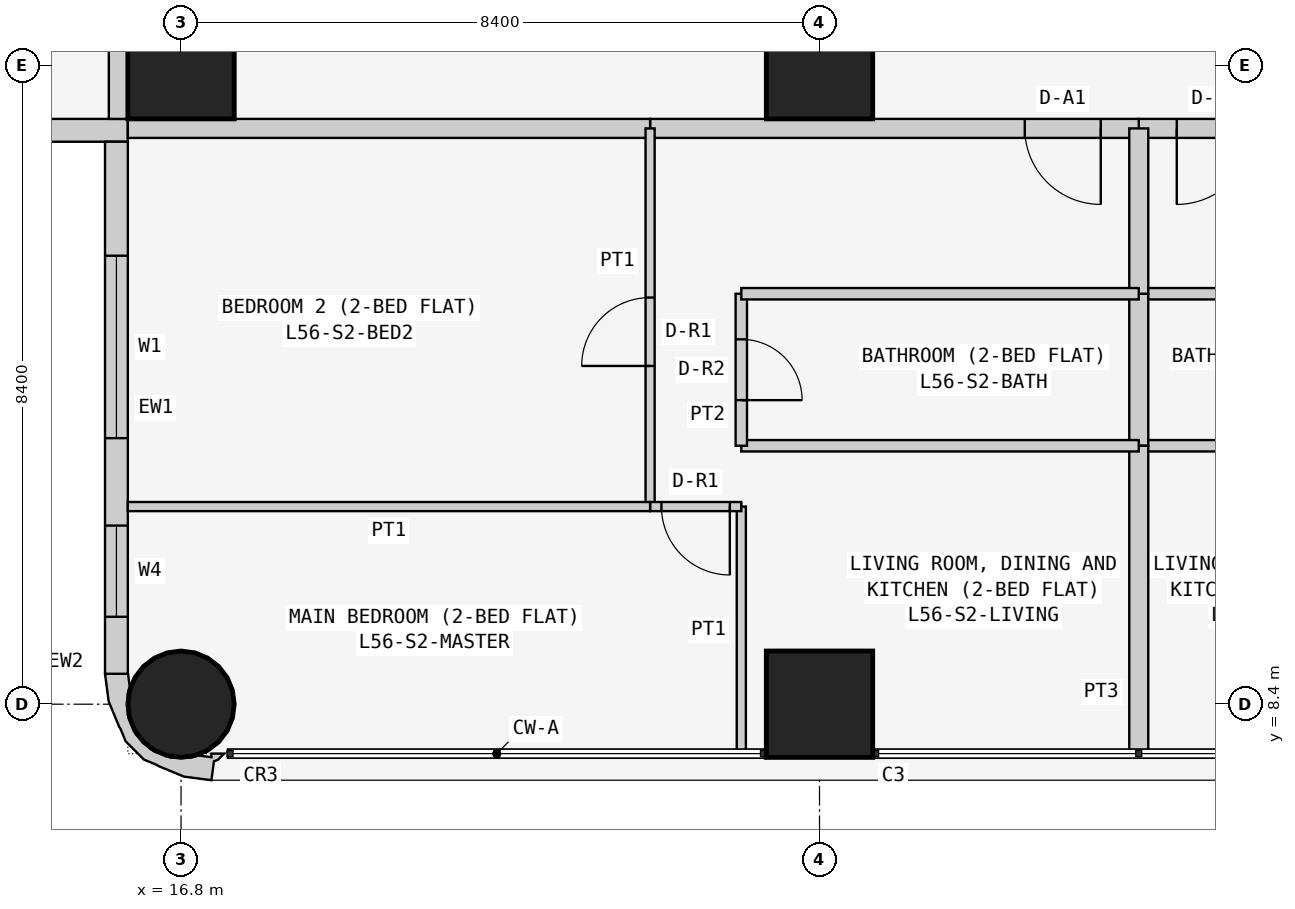
"""IFC4 building model, lengths in metres.
Left out: names, types, materials, properties, quantities, classifications, styles, units other than length and angle.
Written with IfcOpenShell. Run it as: python <this file> out.ifc"""

import sys

from ifc_helpers import new_model, si_unit, direction, frame, frame_2d, origin, origin_2d, place, context, subcontext, project, spatial, polyline, rectangle, circle, outline, extrude, element, fill, save


model = new_model("IFC4")
c1 = context("Model", 3, precision=1e-05, world=origin(), true_north=direction((0.0, 1.0)))
c2 = subcontext(c1, "Body", "Model", "MODEL_VIEW")
j1 = project(units=[si_unit("LENGTHUNIT", "METRE"), si_unit("PLANEANGLEUNIT", "RADIAN")], contexts=[c1])
p1 = place(None, origin())
s1 = spatial("IfcSite", under=j1, at=p1, CompositionType="ELEMENT")
p2 = place(p1, origin())
s2 = spatial("IfcBuilding", under=s1, at=p2, CompositionType="ELEMENT")
p3 = place(p2, frame((0.0, 0.0, 215.7)))
s3 = spatial("IfcBuildingStorey", under=s2, at=p3, CompositionType="ELEMENT", Elevation=215.7)
p4 = place(p3, frame((16.8, 8.4, 0.0), z_axis=(0.0, 0.0, 1.0), x_axis=(1.0, 0.0, 0.0)))
e1 = element("IfcColumn", 1, at=p4, inside=s3, PredefinedType="COLUMN", context=c2, shape_type="SweptSolid", body=[
    extrude(circle(Radius=0.7, at=origin_2d()), origin(), (0.0, 0.0, 1.0), 3.6),
])
for number, where, z_axis, x_axis in (
    (2, (16.8, 16.8, 0.0), (0.0, 0.0, 1.0), (1.0, 0.0, 0.0)),
    (3, (25.2, 8.4, 0.0), (0.0, 0.0, 1.0), (1.0, 0.0, 0.0)),
    (4, (25.2, 16.8, 0.0), (0.0, 0.0, 1.0), (1.0, 0.0, 0.0)),
):
    element("IfcColumn", number, at=place(p3, frame(where, z_axis=z_axis, x_axis=x_axis)), inside=s3, PredefinedType="COLUMN", context=c2, shape_type="SweptSolid", body=[
        extrude(rectangle(XDim=1.4, YDim=1.4, at=origin_2d()), origin(), (0.0, 0.0, 1.0), 3.6),
    ])
p5 = place(p3, frame((0.4, 15.95, 0.0), z_axis=(0.0, 0.0, 1.0), x_axis=(1.0, 0.0, 0.0)))
e5 = element("IfcWall", 5, at=p5, inside=s3, PredefinedType="SOLIDWALL", context=c2, shape_type="SweptSolid", body=[
    extrude(rectangle(XDim=15.7, YDim=0.3, at=frame_2d((7.85, 0.0))), origin(), (0.0, 0.0, 1.0), 3.45),
])
p6 = place(p5, frame((12.4, 0.0, 0.9)))
e6 = element("IfcOpeningElement", 6, at=p6, cuts=e5, PredefinedType="OPENING", context=c2, shape_type="SweptSolid", body=[
    extrude(rectangle(XDim=1.8, YDim=1.5, at=frame_2d((0.9, 0.75))), frame((0.0, 0.16, 0.0), z_axis=(0.0, -1.0, 0.0), x_axis=(1.0, 0.0, 0.0)), (0.0, 0.0, 1.0), 0.32),
])
p7 = place(p5, frame((9.55, 0.0, 1.5)))
e7 = element("IfcOpeningElement", 7, at=p7, cuts=e5, PredefinedType="OPENING", context=c2, shape_type="SweptSolid", body=[
    extrude(rectangle(XDim=0.9, YDim=0.7, at=frame_2d((0.45, 0.35))), frame((0.0, 0.16, 0.0), z_axis=(0.0, -1.0, 0.0), x_axis=(1.0, 0.0, 0.0)), (0.0, 0.0, 1.0), 0.32),
])
p8 = place(p5, frame((5.1, 0.0, 0.9)))
e8 = element("IfcOpeningElement", 8, at=p8, cuts=e5, PredefinedType="OPENING", context=c2, shape_type="SweptSolid", body=[
    extrude(rectangle(XDim=1.8, YDim=1.5, at=frame_2d((0.9, 0.75))), frame((0.0, 0.16, 0.0), z_axis=(0.0, -1.0, 0.0), x_axis=(1.0, 0.0, 0.0)), (0.0, 0.0, 1.0), 0.32),
])
p9 = place(p5, frame((2.0, 0.0, 0.0)))
e9 = element("IfcOpeningElement", 9, at=p9, cuts=e5, PredefinedType="OPENING", context=c2, shape_type="SweptSolid", body=[
    extrude(rectangle(XDim=0.9, YDim=2.4, at=frame_2d((0.45, 1.2))), frame((0.0, 0.16, 0.0), z_axis=(0.0, -1.0, 0.0), x_axis=(1.0, 0.0, 0.0)), (0.0, 0.0, 1.0), 0.32),
])
p10 = place(p5, frame((0.7, 0.0, 0.9)))
e10 = element("IfcOpeningElement", 10, at=p10, cuts=e5, PredefinedType="OPENING", context=c2, shape_type="SweptSolid", body=[
    extrude(rectangle(XDim=1.2, YDim=1.5, at=frame_2d((0.6, 0.75))), frame((0.0, 0.16, 0.0), z_axis=(0.0, -1.0, 0.0), x_axis=(1.0, 0.0, 0.0)), (0.0, 0.0, 1.0), 0.32),
])
p11 = place(p3, frame((15.95, 15.8, 0.0), z_axis=(0.0, 0.0, 1.0), x_axis=(0.0, -1.0, 0.0)))
e11 = element("IfcWall", 11, at=p11, inside=s3, PredefinedType="SOLIDWALL", context=c2, shape_type="SweptSolid", body=[
    extrude(rectangle(XDim=7.0, YDim=0.3, at=frame_2d((3.5, 0.0))), origin(), (0.0, 0.0, 1.0), 3.45),
])
p12 = place(p11, frame((1.5, 0.0, 0.9)))
e12 = element("IfcOpeningElement", 12, at=p12, cuts=e11, PredefinedType="OPENING", context=c2, shape_type="SweptSolid", body=[
    extrude(rectangle(XDim=2.4, YDim=1.5, at=frame_2d((1.2, 0.75))), frame((0.0, 0.16, 0.0), z_axis=(0.0, -1.0, 0.0), x_axis=(1.0, 0.0, 0.0)), (0.0, 0.0, 1.0), 0.32),
])
p13 = place(p11, frame((5.05, 0.0, 0.9)))
e13 = element("IfcOpeningElement", 13, at=p13, cuts=e11, PredefinedType="OPENING", context=c2, shape_type="SweptSolid", body=[
    extrude(rectangle(XDim=1.2, YDim=1.5, at=frame_2d((0.6, 0.75))), frame((0.0, 0.16, 0.0), z_axis=(0.0, -1.0, 0.0), x_axis=(1.0, 0.0, 0.0)), (0.0, 0.0, 1.0), 0.32),
])
p14 = place(p3, frame((16.076, 8.69, 0.0), z_axis=(0.0, 0.0, 1.0), x_axis=(-0.439933741929, -0.898030234854, 0.0)))
e14 = element("IfcWall", 14, at=p14, inside=s3, PredefinedType="SOLIDWALL", context=c2, shape_type="SweptSolid", body=[
    extrude(outline(polyline([(0.664, 1.577), (0.426, 1.497), (0.382, 1.536), (0.276, 1.572), (0.349, 1.423), (0.392, 1.444), (0.453, 1.261), (0.51, 1.211), (0.632, 0.961), (0.65, 0.683), (0.56, 0.419), (0.375, 0.21), (0.125, 0.087), (0.05, 0.082), (-0.127, -0.035), (-0.145, -0.044), (0.022, -0.296), (0.327, -0.094), (0.568, 0.18), (0.578, 0.199), (0.7, 0.337), (0.811, 0.661), (0.799, 0.846), (0.803, 0.866), (0.78, 1.231), (0.664, 1.577)])), origin(), (0.0, 0.0, 1.0), 3.45),
])
p15 = place(p3, frame((35.829, 15.975, 0.0), z_axis=(0.0, 0.0, 1.0), x_axis=(-1.0, 0.0, 0.0)))
e15 = element("IfcWall", 15, at=p15, inside=s3, PredefinedType="PARTITIONING", context=c2, shape_type="SweptSolid", body=[
    extrude(rectangle(XDim=6.429, YDim=0.25, at=frame_2d((3.215, 0.0))), origin(), (0.0, 0.0, 1.0), 3.45),
])
p16 = place(p15, frame((4.929, 0.0, 0.0)))
e16 = element("IfcOpeningElement", 16, at=p16, cuts=e15, PredefinedType="OPENING", context=c2, shape_type="SweptSolid", body=[
    extrude(rectangle(XDim=1.0, YDim=2.1, at=frame_2d((0.5, 1.05))), frame((0.0, 0.135, 0.0), z_axis=(0.0, -1.0, 0.0), x_axis=(1.0, 0.0, 0.0)), (0.0, 0.0, 1.0), 0.27),
])
p17 = place(p3, frame((29.4, 15.975, 0.0), z_axis=(0.0, 0.0, 1.0), x_axis=(-1.0, 0.0, 0.0)))
e17 = element("IfcWall", 17, at=p17, inside=s3, PredefinedType="PARTITIONING", context=c2, shape_type="SweptSolid", body=[
    extrude(rectangle(XDim=6.429, YDim=0.25, at=frame_2d((3.214, 0.0))), origin(), (0.0, 0.0, 1.0), 3.45),
])
p18 = place(p17, frame((0.5, 0.0, 0.0)))
e18 = element("IfcOpeningElement", 18, at=p18, cuts=e17, PredefinedType="OPENING", context=c2, shape_type="SweptSolid", body=[
    extrude(rectangle(XDim=1.0, YDim=2.1, at=frame_2d((0.5, 1.05))), frame((0.0, 0.135, 0.0), z_axis=(0.0, -1.0, 0.0), x_axis=(1.0, 0.0, 0.0)), (0.0, 0.0, 1.0), 0.27),
])
p19 = place(p3, frame((22.971, 15.975, 0.0), z_axis=(0.0, 0.0, 1.0), x_axis=(-1.0, 0.0, 0.0)))
e19 = element("IfcWall", 19, at=p19, inside=s3, PredefinedType="PARTITIONING", context=c2, shape_type="SweptSolid", body=[
    extrude(rectangle(XDim=6.871, YDim=0.25, at=frame_2d((3.436, 0.0))), origin(), (0.0, 0.0, 1.0), 3.45),
])
p20 = place(p3, frame((15.975, 16.1, 0.0), z_axis=(0.0, 0.0, 1.0), x_axis=(0.0, 1.0, 0.0)))
e20 = element("IfcWall", 20, at=p20, inside=s3, PredefinedType="PARTITIONING", context=c2, shape_type="SweptSolid", body=[
    extrude(rectangle(XDim=6.471, YDim=0.25, at=frame_2d((3.235, 0.0))), origin(), (0.0, 0.0, 1.0), 3.45),
])
for number, where, z_axis, x_axis in (
    (21, (29.4, 11.8, 0.0), (0.0, 0.0, 1.0), (1.0, 0.0, 0.0)),
    (22, (34.629, 13.8, 0.0), (0.0, 0.0, 1.0), (-1.0, 0.0, 0.0)),
):
    element("IfcWall", number, at=place(p3, frame(where, z_axis=z_axis, x_axis=x_axis)), inside=s3, PredefinedType="PARTITIONING", context=c2, shape_type="SweptSolid", body=[
        extrude(rectangle(XDim=5.229, YDim=0.15, at=frame_2d((2.615, 0.0))), origin(), (0.0, 0.0, 1.0), 3.45),
    ])
p21 = place(p3, frame((29.4, 13.8, 0.0), z_axis=(0.0, 0.0, 1.0), x_axis=(0.0, -1.0, 0.0)))
e23 = element("IfcWall", 23, at=p21, inside=s3, PredefinedType="PARTITIONING", context=c2, shape_type="SweptSolid", body=[
    extrude(rectangle(XDim=2.0, YDim=0.25, at=frame_2d((1.0, 0.0))), origin(), (0.0, 0.0, 1.0), 2.848),
])
p22 = place(p3, frame((29.4, 7.75, 0.0), z_axis=(0.0, 0.0, 1.0), x_axis=(0.0, 1.0, 0.0)))
e24 = element("IfcWall", 24, at=p22, inside=s3, PredefinedType="PARTITIONING", context=c2, shape_type="SweptSolid", body=[
    extrude(rectangle(XDim=4.05, YDim=0.25, at=frame_2d((2.025, 0.0))), origin(), (0.0, 0.0, 1.0), 2.848),
])
p23 = place(p3, frame((29.4, 13.8, 0.0), z_axis=(0.0, 0.0, 1.0), x_axis=(0.0, 1.0, 0.0)))
e25 = element("IfcWall", 25, at=p23, inside=s3, PredefinedType="PARTITIONING", context=c2, shape_type="SweptSolid", body=[
    extrude(rectangle(XDim=2.175, YDim=0.25, at=frame_2d((1.087, 0.0))), origin(), (0.0, 0.0, 1.0), 2.848),
])
p24 = place(p3, frame((29.4, 11.8, 0.0), z_axis=(0.0, 0.0, 1.0), x_axis=(-1.0, 0.0, 0.0)))
e26 = element("IfcWall", 26, at=p24, inside=s3, PredefinedType="PARTITIONING", context=c2, shape_type="SweptSolid", body=[
    extrude(rectangle(XDim=5.229, YDim=0.15, at=frame_2d((2.615, 0.0))), origin(), (0.0, 0.0, 1.0), 3.45),
])
p25 = place(p3, frame((24.171, 11.8, 0.0), z_axis=(0.0, 0.0, 1.0), x_axis=(0.0, 1.0, 0.0)))
e27 = element("IfcWall", 27, at=p25, inside=s3, PredefinedType="PARTITIONING", context=c2, shape_type="SweptSolid", body=[
    extrude(rectangle(XDim=2.0, YDim=0.15, at=frame_2d((1.0, 0.0))), origin(), (0.0, 0.0, 1.0), 3.45),
])
p26 = place(p25, frame((0.6, 0.0, 0.0)))
e28 = element("IfcOpeningElement", 28, at=p26, cuts=e27, PredefinedType="OPENING", context=c2, shape_type="SweptSolid", body=[
    extrude(rectangle(XDim=0.8, YDim=2.1, at=frame_2d((0.4, 1.05))), frame((0.0, 0.085, 0.0), z_axis=(0.0, -1.0, 0.0), x_axis=(1.0, 0.0, 0.0)), (0.0, 0.0, 1.0), 0.17),
])
p27 = place(p3, frame((24.171, 13.8, 0.0), z_axis=(0.0, 0.0, 1.0), x_axis=(1.0, 0.0, 0.0)))
e29 = element("IfcWall", 29, at=p27, inside=s3, PredefinedType="PARTITIONING", context=c2, shape_type="SweptSolid", body=[
    extrude(rectangle(XDim=5.229, YDim=0.15, at=frame_2d((2.615, 0.0))), origin(), (0.0, 0.0, 1.0), 3.45),
])
p28 = place(p3, frame((22.971, 11.0, 0.0), z_axis=(0.0, 0.0, 1.0), x_axis=(0.0, 1.0, 0.0)))
e30 = element("IfcWall", 30, at=p28, inside=s3, PredefinedType="PARTITIONING", context=c2, shape_type="SweptSolid", body=[
    extrude(rectangle(XDim=4.975, YDim=0.12, at=frame_2d((2.488, 0.0))), origin(), (0.0, 0.0, 1.0), 3.45),
])
p29 = place(p28, frame((1.85, 0.0, 0.0)))
e31 = element("IfcOpeningElement", 31, at=p29, cuts=e30, PredefinedType="OPENING", context=c2, shape_type="SweptSolid", body=[
    extrude(rectangle(XDim=0.9, YDim=2.1, at=frame_2d((0.45, 1.05))), frame((0.0, 0.07, 0.0), z_axis=(0.0, -1.0, 0.0), x_axis=(1.0, 0.0, 0.0)), (0.0, 0.0, 1.0), 0.14),
])
p30 = place(p3, frame((24.171, 7.75, 0.0), z_axis=(0.0, 0.0, 1.0), x_axis=(0.0, 1.0, 0.0)))
e32 = element("IfcWall", 32, at=p30, inside=s3, PredefinedType="PARTITIONING", context=c2, shape_type="SweptSolid", body=[
    extrude(rectangle(XDim=3.25, YDim=0.12, at=frame_2d((1.625, 0.0))), origin(), (0.0, 0.0, 1.0), 3.45),
])
p31 = place(p3, frame((24.171, 11.0, 0.0), z_axis=(0.0, 0.0, 1.0), x_axis=(-1.0, 0.0, 0.0)))
e33 = element("IfcWall", 33, at=p31, inside=s3, PredefinedType="PARTITIONING", context=c2, shape_type="SweptSolid", body=[
    extrude(rectangle(XDim=1.2, YDim=0.12, at=frame_2d((0.6, 0.0))), origin(), (0.0, 0.0, 1.0), 3.45),
])
p32 = place(p31, frame((0.151, 0.0, 0.0)))
e34 = element("IfcOpeningElement", 34, at=p32, cuts=e33, PredefinedType="OPENING", context=c2, shape_type="SweptSolid", body=[
    extrude(rectangle(XDim=0.9, YDim=2.1, at=frame_2d((0.45, 1.05))), frame((0.0, 0.07, 0.0), z_axis=(0.0, -1.0, 0.0), x_axis=(1.0, 0.0, 0.0)), (0.0, 0.0, 1.0), 0.14),
])
p33 = place(p3, frame((22.971, 11.0, 0.0), z_axis=(0.0, 0.0, 1.0), x_axis=(-1.0, 0.0, 0.0)))
e35 = element("IfcWall", 35, at=p33, inside=s3, PredefinedType="PARTITIONING", context=c2, shape_type="SweptSolid", body=[
    extrude(rectangle(XDim=6.871, YDim=0.12, at=frame_2d((3.436, 0.0))), origin(), (0.0, 0.0, 1.0), 3.45),
])
p34 = place(p12, origin())
e36 = element("IfcWindow", 36, at=p34, inside=s3, PartitioningType="SINGLE_PANEL", PredefinedType="WINDOW", context=c2, shape_type="SweptSolid", body=[
    extrude(rectangle(XDim=2.4, YDim=1.5, at=frame_2d((1.2, 0.75))), frame((0.0, 0.03, 0.0), z_axis=(0.0, -1.0, 0.0), x_axis=(1.0, 0.0, 0.0)), (0.0, 0.0, 1.0), 0.06),
])
fill(e12, e36)
p35 = place(p13, origin())
e37 = element("IfcWindow", 37, at=p35, inside=s3, PartitioningType="SINGLE_PANEL", PredefinedType="WINDOW", context=c2, shape_type="SweptSolid", body=[
    extrude(rectangle(XDim=1.2, YDim=1.5, at=frame_2d((0.6, 0.75))), frame((0.0, 0.03, 0.0), z_axis=(0.0, -1.0, 0.0), x_axis=(1.0, 0.0, 0.0)), (0.0, 0.0, 1.0), 0.06),
])
fill(e13, e37)
p36 = place(p16, origin())
e38 = element("IfcDoor", 38, at=p36, inside=s3, OperationType="SINGLE_SWING_RIGHT", PredefinedType="DOOR", context=c2, shape_type="SweptSolid", body=[
    extrude(rectangle(XDim=1.0, YDim=2.1, at=frame_2d((0.5, 1.05))), frame((0.0, 0.025, 0.0), z_axis=(0.0, -1.0, 0.0), x_axis=(1.0, 0.0, 0.0)), (0.0, 0.0, 1.0), 0.05),
])
fill(e16, e38)
p37 = place(p18, origin())
e39 = element("IfcDoor", 39, at=p37, inside=s3, OperationType="SINGLE_SWING_LEFT", PredefinedType="DOOR", context=c2, shape_type="SweptSolid", body=[
    extrude(rectangle(XDim=1.0, YDim=2.1, at=frame_2d((0.5, 1.05))), frame((0.0, 0.025, 0.0), z_axis=(0.0, -1.0, 0.0), x_axis=(1.0, 0.0, 0.0)), (0.0, 0.0, 1.0), 0.05),
])
fill(e18, e39)
p38 = place(p26, frame((0.8, 0.0, 0.0), z_axis=(0.0, 0.0, 1.0), x_axis=(-1.0, 0.0, 0.0)))
e40 = element("IfcDoor", 40, at=p38, inside=s3, OperationType="SINGLE_SWING_RIGHT", PredefinedType="DOOR", context=c2, shape_type="SweptSolid", body=[
    extrude(rectangle(XDim=0.8, YDim=2.1, at=frame_2d((0.4, 1.05))), frame((0.0, 0.025, 0.0), z_axis=(0.0, -1.0, 0.0), x_axis=(1.0, 0.0, 0.0)), (0.0, 0.0, 1.0), 0.05),
])
fill(e28, e40)
p39 = place(p29, origin())
e41 = element("IfcDoor", 41, at=p39, inside=s3, OperationType="SINGLE_SWING_LEFT", PredefinedType="DOOR", context=c2, shape_type="SweptSolid", body=[
    extrude(rectangle(XDim=0.9, YDim=2.1, at=frame_2d((0.45, 1.05))), frame((0.0, 0.025, 0.0), z_axis=(0.0, -1.0, 0.0), x_axis=(1.0, 0.0, 0.0)), (0.0, 0.0, 1.0), 0.05),
])
fill(e31, e41)
p40 = place(p32, origin())
e42 = element("IfcDoor", 42, at=p40, inside=s3, OperationType="SINGLE_SWING_LEFT", PredefinedType="DOOR", context=c2, shape_type="SweptSolid", body=[
    extrude(rectangle(XDim=0.9, YDim=2.1, at=frame_2d((0.45, 1.05))), frame((0.0, 0.025, 0.0), z_axis=(0.0, -1.0, 0.0), x_axis=(1.0, 0.0, 0.0)), (0.0, 0.0, 1.0), 0.05),
])
fill(e34, e42)
save(model, sys.argv[1])
